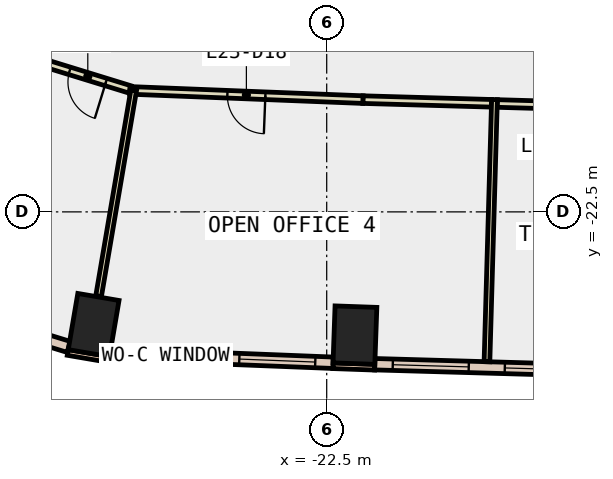
"""IFC4 building model, lengths in metres.
Left out: names, types, materials, properties, quantities, classifications, styles, units other than length and angle.
Written with IfcOpenShell. Run it as: python <this file> out.ifc"""

import sys

from ifc_helpers import new_model, si_unit, direction, frame, frame_2d, origin, origin_2d, place, context, subcontext, project, spatial, rectangle, extrude, element, fill, save


model = new_model("IFC4")
c1 = context("Model", 3, precision=1e-05, world=origin(), true_north=direction((0.0, 1.0)))
c2 = subcontext(c1, "Body", "Model", "MODEL_VIEW")
j1 = project(units=[si_unit("LENGTHUNIT", "METRE"), si_unit("PLANEANGLEUNIT", "RADIAN")], contexts=[c1])
p1 = place(None, origin())
s1 = spatial("IfcSite", under=j1, at=p1, CompositionType="ELEMENT")
p2 = place(p1, origin())
s2 = spatial("IfcBuilding", under=s1, at=p2, CompositionType="ELEMENT")
p3 = place(p2, frame((0.0, 0.0, 107.6)))
s3 = spatial("IfcBuildingStorey", under=s2, at=p3, CompositionType="ELEMENT", Elevation=107.6)
for number, where, z_axis, x_axis in (
    (1, (-28.633, -25.478, -0.4), (0.0, 0.0, 1.0), (-0.986, 0.168, 0.0)),
    (2, (-21.757, -25.743, -0.4), (0.0, 0.0, 1.0), (-0.999, 0.035, 0.0)),
):
    element("IfcColumn", number, at=place(p3, frame(where, z_axis=z_axis, x_axis=x_axis)), inside=s3, PredefinedType="COLUMN", context=c2, shape_type="SweptSolid", body=[
        extrude(rectangle(XDim=1.1, YDim=1.5, at=origin_2d()), origin(), (0.0, 0.0, 1.0), 4.2),
    ])
p4 = place(p3, frame((-29.314, -26.199, 0.0), z_axis=(0.0, 0.0, 1.0), x_axis=(0.985763338892, -0.168138751323, 0.0)))
e3 = element("IfcWall", 3, at=p4, inside=s3, PredefinedType="STANDARD", context=c2, shape_type="SweptSolid", body=[
    extrude(rectangle(XDim=1.101, YDim=0.15, at=frame_2d((0.55, 0.0))), origin(), (0.0, 0.0, 1.0), 3.8),
])
p5 = place(p3, frame((-22.336, -26.548, 0.0), z_axis=(0.0, 0.0, 1.0), x_axis=(0.999376638472, -0.035303462679, 0.0)))
e4 = element("IfcWall", 4, at=p5, inside=s3, PredefinedType="STANDARD", context=c2, shape_type="SweptSolid", body=[
    extrude(rectangle(XDim=1.1, YDim=0.15, at=frame_2d((0.55, 0.0))), origin(), (0.0, 0.0, 1.0), 3.8),
])
p6 = place(p3, frame((-28.205, -26.238, 0.0), z_axis=(0.0, 0.0, 1.0), x_axis=(0.99922113396, -0.039460428885, 0.0)))
e5 = element("IfcWall", 5, at=p6, inside=s3, PredefinedType="STANDARD", context=c2, shape_type="SweptSolid", body=[
    extrude(rectangle(XDim=5.878, YDim=0.3, at=frame_2d((2.939, 0.0))), origin(), (0.0, 0.0, 1.0), 3.8),
])
p7 = place(p6, frame((0.469, 0.0, 0.9)))
e6 = element("IfcOpeningElement", 6, at=p7, cuts=e5, PredefinedType="OPENING", context=c2, shape_type="SweptSolid", body=[
    extrude(rectangle(XDim=2.0, YDim=2.6, at=frame_2d((1.0, 1.3))), frame((0.0, 0.16, 0.0), z_axis=(0.0, -1.0, 0.0), x_axis=(1.0, 0.0, 0.0)), (0.0, 0.0, 1.0), 0.32),
])
p8 = place(p6, frame((3.408, 0.0, 0.9)))
e7 = element("IfcOpeningElement", 7, at=p8, cuts=e5, PredefinedType="OPENING", context=c2, shape_type="SweptSolid", body=[
    extrude(rectangle(XDim=2.0, YDim=2.6, at=frame_2d((1.0, 1.3))), frame((0.0, 0.16, 0.0), z_axis=(0.0, -1.0, 0.0), x_axis=(1.0, 0.0, 0.0)), (0.0, 0.0, 1.0), 0.32),
])
p9 = place(p3, frame((-21.235, -26.508, 0.0), z_axis=(0.0, 0.0, 1.0), x_axis=(0.999589583914, -0.028647229026, 0.0)))
e8 = element("IfcWall", 8, at=p9, inside=s3, PredefinedType="STANDARD", context=c2, shape_type="SweptSolid", body=[
    extrude(rectangle(XDim=5.897, YDim=0.3, at=frame_2d((2.949, 0.0))), origin(), (0.0, 0.0, 1.0), 3.8),
])
p10 = place(p9, frame((0.474, 0.0, 0.9)))
e9 = element("IfcOpeningElement", 9, at=p10, cuts=e8, PredefinedType="OPENING", context=c2, shape_type="SweptSolid", body=[
    extrude(rectangle(XDim=2.0, YDim=2.6, at=frame_2d((1.0, 1.3))), frame((0.0, 0.16, 0.0), z_axis=(0.0, -1.0, 0.0), x_axis=(1.0, 0.0, 0.0)), (0.0, 0.0, 1.0), 0.32),
])
p11 = place(p9, frame((3.423, 0.0, 0.9)))
e10 = element("IfcOpeningElement", 10, at=p11, cuts=e8, PredefinedType="OPENING", context=c2, shape_type="SweptSolid", body=[
    extrude(rectangle(XDim=2.0, YDim=2.6, at=frame_2d((1.0, 1.3))), frame((0.0, 0.16, 0.0), z_axis=(0.0, -1.0, 0.0), x_axis=(1.0, 0.0, 0.0)), (0.0, 0.0, 1.0), 0.32),
])
p12 = place(p3, frame((-32.924, -24.935, 0.0), z_axis=(0.0, 0.0, 1.0), x_axis=(0.955841433148, -0.293882892794, 0.0)))
e11 = element("IfcWall", 11, at=p12, inside=s3, PredefinedType="STANDARD", context=c2, shape_type="SweptSolid", body=[
    extrude(rectangle(XDim=3.804, YDim=0.3, at=frame_2d((1.902, 0.0))), origin(), (0.0, 0.0, 1.0), 3.8),
])
p13 = place(p12, frame((1.202, 0.0, 0.9)))
e12 = element("IfcOpeningElement", 12, at=p13, cuts=e11, PredefinedType="OPENING", context=c2, shape_type="SweptSolid", body=[
    extrude(rectangle(XDim=1.4, YDim=2.6, at=frame_2d((0.7, 1.3))), frame((0.0, 0.16, 0.0), z_axis=(0.0, -1.0, 0.0), x_axis=(1.0, 0.0, 0.0)), (0.0, 0.0, 1.0), 0.32),
])
p14 = place(p3, frame((-27.676, -19.278, 0.0), z_axis=(0.0, 0.0, 1.0), x_axis=(-0.95581080774, 0.293982482143, 0.0)))
e13 = element("IfcWall", 13, at=p14, inside=s3, PredefinedType="PARTITIONING", context=c2, shape_type="SweptSolid", body=[
    extrude(rectangle(XDim=2.324, YDim=0.2, at=frame_2d((1.162, 0.0))), origin(), (0.0, 0.0, 1.0), 3.8),
])
p15 = place(p14, frame((0.662, 0.0, 0.0)))
e14 = element("IfcOpeningElement", 14, at=p15, cuts=e13, PredefinedType="OPENING", context=c2, shape_type="SweptSolid", body=[
    extrude(rectangle(XDim=1.0, YDim=2.1, at=frame_2d((0.5, 1.05))), frame((0.0, 0.11, 0.0), z_axis=(0.0, -1.0, 0.0), x_axis=(1.0, 0.0, 0.0)), (0.0, 0.0, 1.0), 0.22),
])
p16 = place(p3, frame((-18.163, -19.643, 0.0), z_axis=(0.0, 0.0, 1.0), x_axis=(-0.999588017684, 0.028701827504, 0.0)))
e15 = element("IfcWall", 15, at=p16, inside=s3, PredefinedType="PARTITIONING", context=c2, shape_type="SweptSolid", body=[
    extrude(rectangle(XDim=3.385, YDim=0.2, at=frame_2d((1.693, 0.0))), origin(), (0.0, 0.0, 1.0), 3.8),
])
p17 = place(p3, frame((-21.547, -19.546, 0.0), z_axis=(0.0, 0.0, 1.0), x_axis=(-0.999216450883, 0.039578836331, 0.0)))
e16 = element("IfcWall", 16, at=p17, inside=s3, PredefinedType="PARTITIONING", context=c2, shape_type="SweptSolid", body=[
    extrude(rectangle(XDim=6.138, YDim=0.2, at=frame_2d((3.069, 0.0))), origin(), (0.0, 0.0, 1.0), 3.8),
])
p18 = place(p17, frame((2.569, 0.0, 0.0)))
e17 = element("IfcOpeningElement", 17, at=p18, cuts=e16, PredefinedType="OPENING", context=c2, shape_type="SweptSolid", body=[
    extrude(rectangle(XDim=1.0, YDim=2.1, at=frame_2d((0.5, 1.05))), frame((0.0, 0.11, 0.0), z_axis=(0.0, -1.0, 0.0), x_axis=(1.0, 0.0, 0.0)), (0.0, 0.0, 1.0), 0.22),
])
p19 = place(p3, frame((-14.631, -19.745, 0.0), z_axis=(0.0, 0.0, 1.0), x_axis=(-0.999587482491, 0.028720460441, 0.0)))
e18 = element("IfcWall", 18, at=p19, inside=s3, PredefinedType="PARTITIONING", context=c2, shape_type="SweptSolid", body=[
    extrude(rectangle(XDim=3.383, YDim=0.2, at=frame_2d((1.692, 0.0))), origin(), (0.0, 0.0, 1.0), 3.8),
])
p20 = place(p19, frame((1.192, 0.0, 0.0)))
e19 = element("IfcOpeningElement", 19, at=p20, cuts=e18, PredefinedType="OPENING", context=c2, shape_type="SweptSolid", body=[
    extrude(rectangle(XDim=1.0, YDim=2.1, at=frame_2d((0.5, 1.05))), frame((0.0, 0.11, 0.0), z_axis=(0.0, -1.0, 0.0), x_axis=(1.0, 0.0, 0.0)), (0.0, 0.0, 1.0), 0.22),
])
p21 = place(p3, frame((-27.58, -19.307, 0.0), z_axis=(0.0, 0.0, 1.0), x_axis=(-0.168089900424, -0.98577167, 0.0)))
e20 = element("IfcWall", 20, at=p21, inside=s3, PredefinedType="PARTITIONING", context=c2, shape_type="SweptSolid", body=[
    extrude(rectangle(XDim=5.49, YDim=0.15, at=frame_2d((2.745, 0.0))), origin(), (0.0, 0.0, 1.0), 3.8),
])
p22 = place(p3, frame((-18.085, -19.545, 0.0), z_axis=(0.0, 0.0, 1.0), x_axis=(-0.02869106823, -0.999588326564, 0.0)))
e21 = element("IfcWall", 21, at=p22, inside=s3, PredefinedType="PARTITIONING", context=c2, shape_type="SweptSolid", body=[
    extrude(rectangle(XDim=6.901, YDim=0.15, at=frame_2d((3.451, 0.0))), origin(), (0.0, 0.0, 1.0), 3.8),
])
p23 = place(p7, origin())
e22 = element("IfcWindow", 22, at=p23, inside=s3, PartitioningType="SINGLE_PANEL", PredefinedType="WINDOW", context=c2, shape_type="SweptSolid", body=[
    extrude(rectangle(XDim=2.0, YDim=2.6, at=frame_2d((1.0, 1.3))), frame((0.0, 0.03, 0.0), z_axis=(0.0, -1.0, 0.0), x_axis=(1.0, 0.0, 0.0)), (0.0, 0.0, 1.0), 0.06),
])
fill(e6, e22)
p24 = place(p8, origin())
e23 = element("IfcWindow", 23, at=p24, inside=s3, PartitioningType="SINGLE_PANEL", PredefinedType="WINDOW", context=c2, shape_type="SweptSolid", body=[
    extrude(rectangle(XDim=2.0, YDim=2.6, at=frame_2d((1.0, 1.3))), frame((0.0, 0.03, 0.0), z_axis=(0.0, -1.0, 0.0), x_axis=(1.0, 0.0, 0.0)), (0.0, 0.0, 1.0), 0.06),
])
fill(e7, e23)
p25 = place(p10, origin())
e24 = element("IfcWindow", 24, at=p25, inside=s3, PartitioningType="SINGLE_PANEL", PredefinedType="WINDOW", context=c2, shape_type="SweptSolid", body=[
    extrude(rectangle(XDim=2.0, YDim=2.6, at=frame_2d((1.0, 1.3))), frame((0.0, 0.03, 0.0), z_axis=(0.0, -1.0, 0.0), x_axis=(1.0, 0.0, 0.0)), (0.0, 0.0, 1.0), 0.06),
])
fill(e9, e24)
p26 = place(p11, origin())
e25 = element("IfcWindow", 25, at=p26, inside=s3, PartitioningType="SINGLE_PANEL", PredefinedType="WINDOW", context=c2, shape_type="SweptSolid", body=[
    extrude(rectangle(XDim=2.0, YDim=2.6, at=frame_2d((1.0, 1.3))), frame((0.0, 0.03, 0.0), z_axis=(0.0, -1.0, 0.0), x_axis=(1.0, 0.0, 0.0)), (0.0, 0.0, 1.0), 0.06),
])
fill(e10, e25)
p27 = place(p15, origin())
e26 = element("IfcDoor", 26, at=p27, inside=s3, OperationType="SINGLE_SWING_LEFT", PredefinedType="DOOR", context=c2, shape_type="SweptSolid", body=[
    extrude(rectangle(XDim=1.0, YDim=2.1, at=frame_2d((0.5, 1.05))), frame((0.0, 0.025, 0.0), z_axis=(0.0, -1.0, 0.0), x_axis=(1.0, 0.0, 0.0)), (0.0, 0.0, 1.0), 0.05),
])
fill(e14, e26)
p28 = place(p18, origin())
e27 = element("IfcDoor", 27, at=p28, inside=s3, OperationType="SINGLE_SWING_LEFT", PredefinedType="DOOR", context=c2, shape_type="SweptSolid", body=[
    extrude(rectangle(XDim=1.0, YDim=2.1, at=frame_2d((0.5, 1.05))), frame((0.0, 0.025, 0.0), z_axis=(0.0, -1.0, 0.0), x_axis=(1.0, 0.0, 0.0)), (0.0, 0.0, 1.0), 0.05),
])
fill(e17, e27)
save(model, sys.argv[1])
